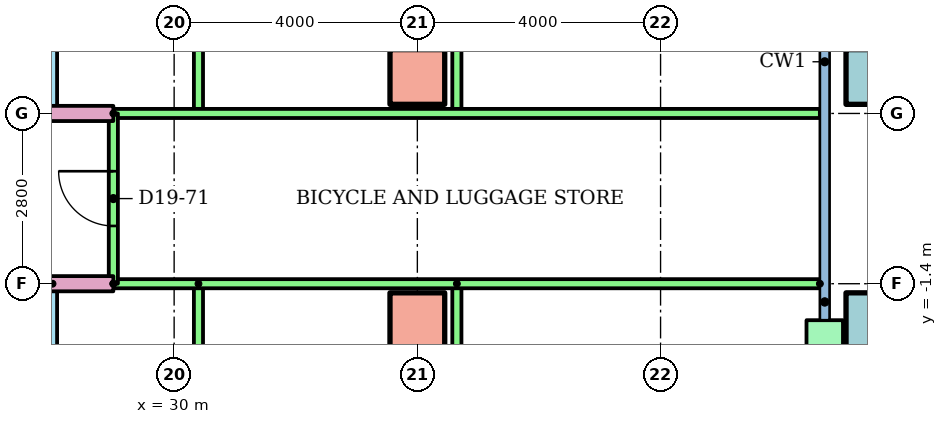
"""IFC4 building model, lengths in metres.
Left out: names, types, materials, properties, quantities, classifications, styles, units other than length and angle.
Written with IfcOpenShell. Run it as: python <this file> out.ifc"""

import sys

from ifc_helpers import new_model, si_unit, direction, frame, frame_2d, origin, origin_2d, place, context, subcontext, project, spatial, rectangle, hollow_rectangle, extrude, element, fill, save


model = new_model("IFC4")
c1 = context("Model", 3, precision=1e-05, world=origin(), true_north=direction((0.0, 1.0)))
c2 = subcontext(c1, "Body", "Model", "MODEL_VIEW")
j1 = project(units=[si_unit("LENGTHUNIT", "METRE"), si_unit("PLANEANGLEUNIT", "RADIAN")], contexts=[c1])
p1 = place(None, origin())
s1 = spatial("IfcSite", under=j1, at=p1, CompositionType="ELEMENT")
p2 = place(p1, origin())
s2 = spatial("IfcBuilding", under=s1, at=p2, CompositionType="ELEMENT")
p3 = place(p2, frame((0.0, 0.0, 77.5)))
s3 = spatial("IfcBuildingStorey", under=s2, at=p3, CompositionType="ELEMENT", Elevation=77.5)
p4 = place(p3, frame((34.0, -2.0, 0.0)))
e1 = element("IfcColumn", 1, at=p4, inside=s3, PredefinedType="COLUMN", context=c2, shape_type="SweptSolid", body=[
    extrude(rectangle(XDim=0.9, YDim=0.9, at=origin_2d()), origin(), (0.0, 0.0, 1.0), 3.2),
])
p5 = place(p3, frame((41.5, -2.0, 0.0)))
e2 = element("IfcColumn", 2, at=p5, inside=s3, PredefinedType="COLUMN", context=c2, shape_type="SweptSolid", body=[
    extrude(hollow_rectangle(XDim=0.9, YDim=0.9, WallThickness=0.045, at=origin_2d()), origin(), (0.0, 0.0, 1.0), 3.2),
])
p6 = place(p3, frame((34.0, 2.0, 0.0)))
e3 = element("IfcColumn", 3, at=p6, inside=s3, PredefinedType="COLUMN", context=c2, shape_type="SweptSolid", body=[
    extrude(rectangle(XDim=0.9, YDim=0.9, at=origin_2d()), origin(), (0.0, 0.0, 1.0), 3.2),
])
p7 = place(p3, frame((41.5, 2.0, 0.0)))
e4 = element("IfcColumn", 4, at=p7, inside=s3, PredefinedType="COLUMN", context=c2, shape_type="SweptSolid", body=[
    extrude(hollow_rectangle(XDim=0.9, YDim=0.9, WallThickness=0.045, at=origin_2d()), origin(), (0.0, 0.0, 1.0), 3.2),
])
p8 = place(p3, frame((40.7, -5.7, 0.0), z_axis=(0.0, 0.0, 1.0), x_axis=(0.0, 1.0, 0.0)))
e5 = element("IfcWall", 5, at=p8, inside=s3, PredefinedType="STANDARD", context=c2, shape_type="SweptSolid", body=[
    extrude(rectangle(XDim=3.7, YDim=0.6, at=frame_2d((1.85, 0.0))), origin(), (0.0, 0.0, 1.0), 2.92),
])
p9 = place(p8, frame((1.25, 0.0, 0.0)))
e6 = element("IfcOpeningElement", 6, at=p9, cuts=e5, PredefinedType="OPENING", context=c2, shape_type="SweptSolid", body=[
    extrude(rectangle(XDim=1.2, YDim=2.1, at=frame_2d((0.6, 1.05))), frame((0.0, 0.31, 0.0), z_axis=(0.0, -1.0, 0.0), x_axis=(1.0, 0.0, 0.0)), (0.0, 0.0, 1.0), 0.62),
])
p10 = place(p3, frame((28.0, -1.4, 0.0), z_axis=(0.0, 0.0, 1.0), x_axis=(0.0, -1.0, 0.0)))
e7 = element("IfcWall", 7, at=p10, inside=s3, PredefinedType="PARTITIONING", context=c2, shape_type="SweptSolid", body=[
    extrude(rectangle(XDim=6.5, YDim=0.15, at=frame_2d((3.25, 0.0))), origin(), (0.0, 0.0, 1.0), 2.4),
])
p11 = place(p10, frame((1.3, 0.0, 0.0)))
e8 = element("IfcOpeningElement", 8, at=p11, cuts=e7, PredefinedType="OPENING", context=c2, shape_type="SweptSolid", body=[
    extrude(rectangle(XDim=0.9, YDim=2.1, at=frame_2d((0.45, 1.05))), frame((0.0, 0.085, 0.0), z_axis=(0.0, -1.0, 0.0), x_axis=(1.0, 0.0, 0.0)), (0.0, 0.0, 1.0), 0.17),
])
p12 = place(p10, frame((4.6, 0.0, 0.0)))
e9 = element("IfcOpeningElement", 9, at=p12, cuts=e7, PredefinedType="OPENING", context=c2, shape_type="SweptSolid", body=[
    extrude(rectangle(XDim=0.8, YDim=2.1, at=frame_2d((0.4, 1.05))), frame((0.0, 0.085, 0.0), z_axis=(0.0, -1.0, 0.0), x_axis=(1.0, 0.0, 0.0)), (0.0, 0.0, 1.0), 0.17),
])
for number, where, z_axis, x_axis in (
    (10, (30.4, -1.4, 0.0), (0.0, 0.0, 1.0), (0.0, -1.0, 0.0)),
    (11, (34.65, -1.4, 0.0), (0.0, 0.0, 1.0), (0.0, -1.0, 0.0)),
):
    element("IfcWall", number, at=place(p3, frame(where, z_axis=z_axis, x_axis=x_axis)), inside=s3, PredefinedType="PARTITIONING", context=c2, shape_type="SweptSolid", body=[
        extrude(rectangle(XDim=6.5, YDim=0.15, at=frame_2d((3.25, 0.0))), origin(), (0.0, 0.0, 1.0), 2.4),
    ])
p13 = place(p3, frame((29.0, -1.4, 0.0), z_axis=(0.0, 0.0, 1.0), x_axis=(-1.0, 0.0, 0.0)))
e12 = element("IfcWall", 12, at=p13, inside=s3, PredefinedType="PARTITIONING", context=c2, shape_type="SweptSolid", body=[
    extrude(rectangle(XDim=15.0, YDim=0.25, at=frame_2d((7.5, 0.0))), origin(), (0.0, 0.0, 1.0), 2.4),
])
p14 = place(p13, frame((1.311, 0.0, 0.0)))
e13 = element("IfcOpeningElement", 13, at=p14, cuts=e12, PredefinedType="OPENING", context=c2, shape_type="SweptSolid", body=[
    extrude(rectangle(XDim=1.0, YDim=2.1, at=frame_2d((0.5, 1.05))), frame((0.0, 0.135, 0.0), z_axis=(0.0, -1.0, 0.0), x_axis=(1.0, 0.0, 0.0)), (0.0, 0.0, 1.0), 0.27),
])
p15 = place(p3, frame((40.62, -1.4, 0.0), z_axis=(0.0, 0.0, 1.0), x_axis=(-1.0, 0.0, 0.0)))
e14 = element("IfcWall", 14, at=p15, inside=s3, PredefinedType="PARTITIONING", context=c2, shape_type="SweptSolid", body=[
    extrude(rectangle(XDim=11.62, YDim=0.15, at=frame_2d((5.81, 0.0))), origin(), (0.0, 0.0, 1.0), 2.4),
])
p16 = place(p3, frame((28.0, 10.3, 0.0), z_axis=(0.0, 0.0, 1.0), x_axis=(0.0, -1.0, 0.0)))
e15 = element("IfcWall", 15, at=p16, inside=s3, PredefinedType="PARTITIONING", context=c2, shape_type="SweptSolid", body=[
    extrude(rectangle(XDim=8.9, YDim=0.15, at=frame_2d((4.45, 0.0))), origin(), (0.0, 0.0, 1.0), 2.4),
])
p17 = place(p16, frame((5.95, 0.0, 0.0)))
e16 = element("IfcOpeningElement", 16, at=p17, cuts=e15, PredefinedType="OPENING", context=c2, shape_type="SweptSolid", body=[
    extrude(rectangle(XDim=0.9, YDim=2.1, at=frame_2d((0.45, 1.05))), frame((0.0, 0.085, 0.0), z_axis=(0.0, -1.0, 0.0), x_axis=(1.0, 0.0, 0.0)), (0.0, 0.0, 1.0), 0.17),
])
p18 = place(p16, frame((1.55, 0.0, 0.0)))
e17 = element("IfcOpeningElement", 17, at=p18, cuts=e15, PredefinedType="OPENING", context=c2, shape_type="SweptSolid", body=[
    extrude(rectangle(XDim=0.8, YDim=2.1, at=frame_2d((0.4, 1.05))), frame((0.0, 0.085, 0.0), z_axis=(0.0, -1.0, 0.0), x_axis=(1.0, 0.0, 0.0)), (0.0, 0.0, 1.0), 0.17),
])
for number, where, z_axis, x_axis in (
    (18, (30.4, 10.3, 0.0), (0.0, 0.0, 1.0), (0.0, -1.0, 0.0)),
    (19, (34.65, 10.3, 0.0), (0.0, 0.0, 1.0), (0.0, -1.0, 0.0)),
):
    element("IfcWall", number, at=place(p3, frame(where, z_axis=z_axis, x_axis=x_axis)), inside=s3, PredefinedType="PARTITIONING", context=c2, shape_type="SweptSolid", body=[
        extrude(rectangle(XDim=8.9, YDim=0.15, at=frame_2d((4.45, 0.0))), origin(), (0.0, 0.0, 1.0), 2.4),
    ])
p19 = place(p3, frame((14.0, 1.4, 0.0)))
e20 = element("IfcWall", 20, at=p19, inside=s3, PredefinedType="PARTITIONING", context=c2, shape_type="SweptSolid", body=[
    extrude(rectangle(XDim=15.0, YDim=0.25, at=frame_2d((7.5, 0.0))), origin(), (0.0, 0.0, 1.0), 2.4),
])
p20 = place(p19, frame((0.5, 0.0, 0.0)))
e21 = element("IfcOpeningElement", 21, at=p20, cuts=e20, PredefinedType="OPENING", context=c2, shape_type="SweptSolid", body=[
    extrude(rectangle(XDim=1.0, YDim=2.1, at=frame_2d((0.5, 1.05))), frame((0.0, 0.135, 0.0), z_axis=(0.0, -1.0, 0.0), x_axis=(1.0, 0.0, 0.0)), (0.0, 0.0, 1.0), 0.27),
])
p21 = place(p19, frame((12.689, 0.0, 0.0)))
e22 = element("IfcOpeningElement", 22, at=p21, cuts=e20, PredefinedType="OPENING", context=c2, shape_type="SweptSolid", body=[
    extrude(rectangle(XDim=1.0, YDim=2.1, at=frame_2d((0.5, 1.05))), frame((0.0, 0.135, 0.0), z_axis=(0.0, -1.0, 0.0), x_axis=(1.0, 0.0, 0.0)), (0.0, 0.0, 1.0), 0.27),
])
p22 = place(p3, frame((29.0, 1.4, 0.0)))
e23 = element("IfcWall", 23, at=p22, inside=s3, PredefinedType="PARTITIONING", context=c2, shape_type="SweptSolid", body=[
    extrude(rectangle(XDim=11.62, YDim=0.15, at=frame_2d((5.81, 0.0))), origin(), (0.0, 0.0, 1.0), 2.4),
])
p23 = place(p3, frame((29.0, -1.4, 0.0), z_axis=(0.0, 0.0, 1.0), x_axis=(0.0, 1.0, 0.0)))
e24 = element("IfcWall", 24, at=p23, inside=s3, PredefinedType="PARTITIONING", context=c2, shape_type="SweptSolid", body=[
    extrude(rectangle(XDim=2.8, YDim=0.15, at=frame_2d((1.4, 0.0))), origin(), (0.0, 0.0, 1.0), 2.4),
])
p24 = place(p23, frame((0.95, 0.0, 0.0)))
e25 = element("IfcOpeningElement", 25, at=p24, cuts=e24, PredefinedType="OPENING", context=c2, shape_type="SweptSolid", body=[
    extrude(rectangle(XDim=0.9, YDim=2.1, at=frame_2d((0.45, 1.05))), frame((0.0, 0.085, 0.0), z_axis=(0.0, -1.0, 0.0), x_axis=(1.0, 0.0, 0.0)), (0.0, 0.0, 1.0), 0.17),
])
p25 = place(p24, origin())
e26 = element("IfcDoor", 26, at=p25, inside=s3, OperationType="SINGLE_SWING_RIGHT", PredefinedType="DOOR", context=c2, shape_type="SweptSolid", body=[
    extrude(rectangle(XDim=0.9, YDim=2.1, at=frame_2d((0.45, 1.05))), frame((0.0, 0.025, 0.0), z_axis=(0.0, -1.0, 0.0), x_axis=(1.0, 0.0, 0.0)), (0.0, 0.0, 1.0), 0.05),
])
fill(e25, e26)
save(model, sys.argv[1])
